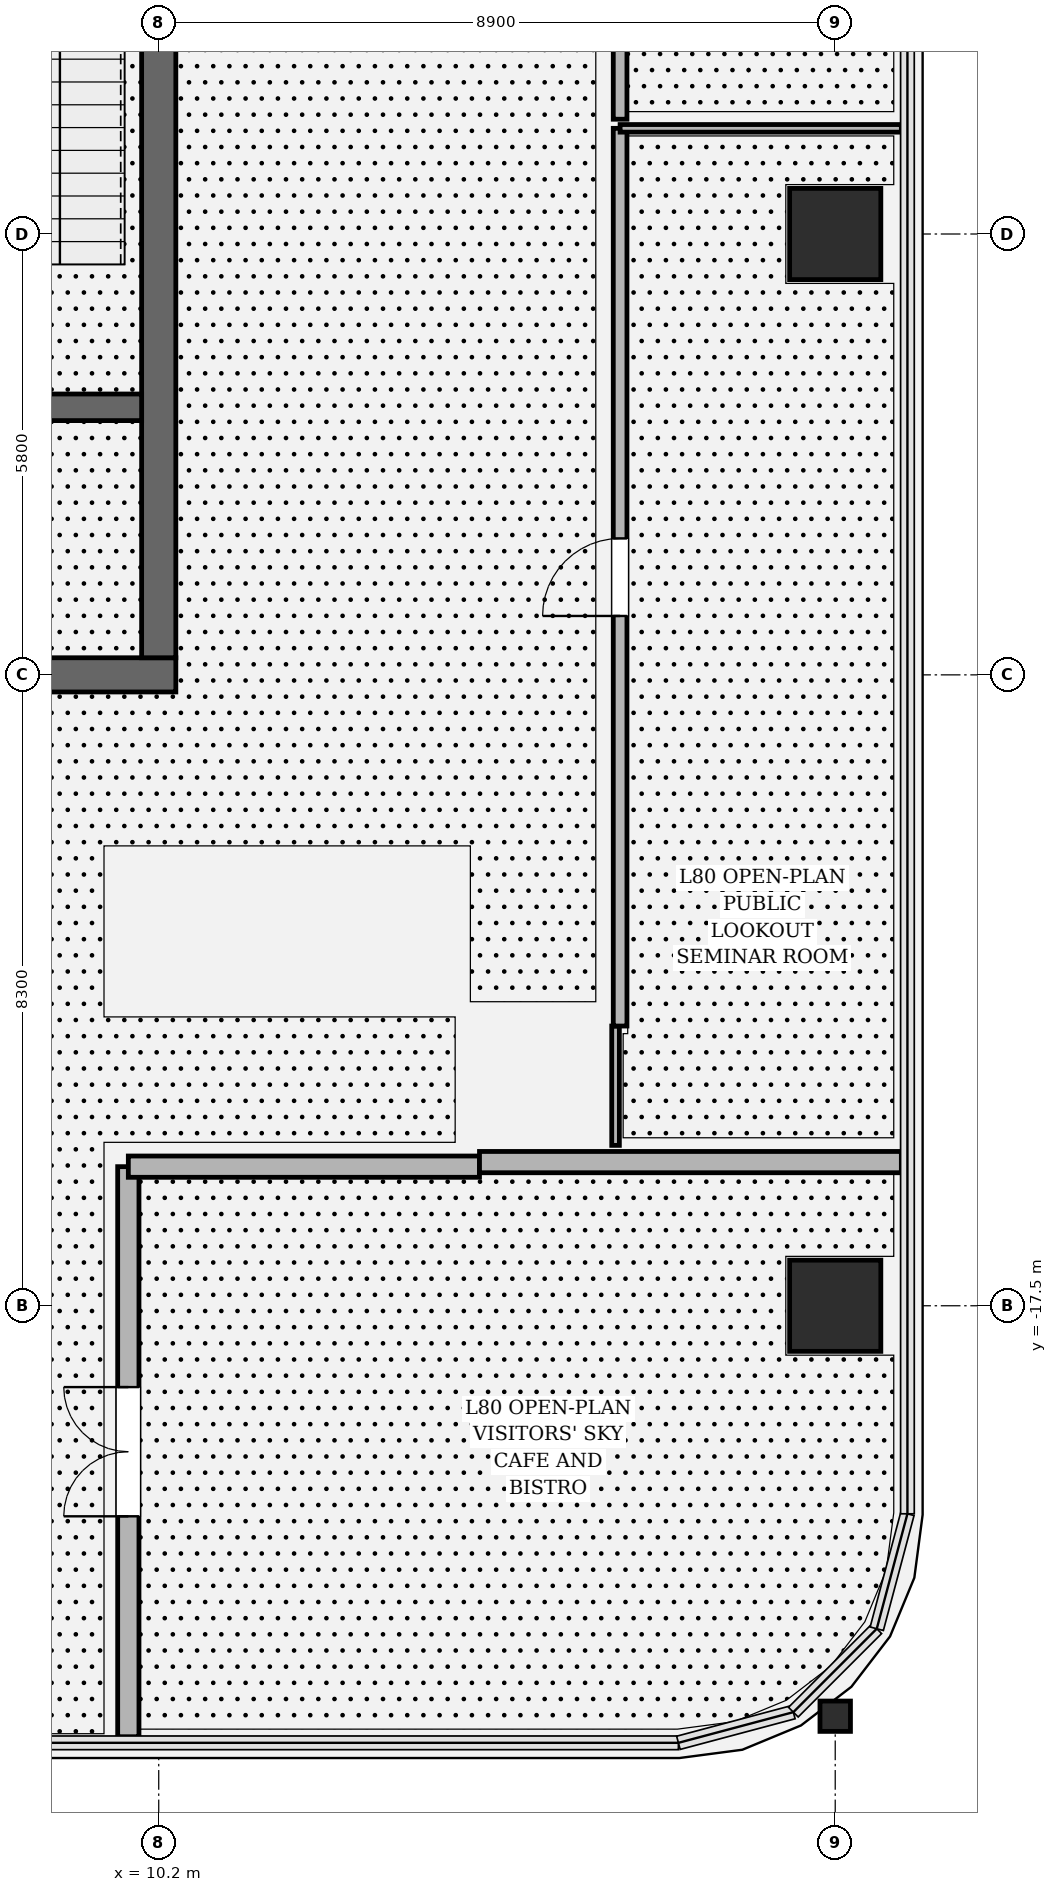
"""IFC4 building model, lengths in metres.
Left out: names, types, materials, properties, quantities, classifications, styles, units other than length and angle.
Written with IfcOpenShell. Run it as: python <this file> out.ifc"""

import sys

from ifc_helpers import new_model, si_unit, direction, frame, frame_2d, origin, origin_2d, place, context, subcontext, project, spatial, rectangle, hollow_rectangle, i_section, extrude, element, fill, save


model = new_model("IFC4")
c1 = context("Model", 3, precision=1e-05, world=origin(), true_north=direction((0.0, 1.0)))
c2 = subcontext(c1, "Body", "Model", "MODEL_VIEW")
j1 = project(units=[si_unit("LENGTHUNIT", "METRE"), si_unit("PLANEANGLEUNIT", "RADIAN")], contexts=[c1])
p1 = place(None, origin())
s1 = spatial("IfcSite", under=j1, at=p1, CompositionType="ELEMENT")
p2 = place(p1, origin())
s2 = spatial("IfcBuilding", under=s1, at=p2, CompositionType="ELEMENT")
p3 = place(p2, frame((0.0, 0.0, 339.0)))
s3 = spatial("IfcBuildingStorey", under=s2, at=p3, CompositionType="ELEMENT", Elevation=339.0)
p4 = place(p3, frame((10.425, -9.2, 0.0), z_axis=(0.0, 0.0, 1.0), x_axis=(-1.0, 0.0, 0.0)))
e1 = element("IfcWall", 1, at=p4, inside=s3, PredefinedType="SHEAR", context=c2, shape_type="SweptSolid", body=[
    extrude(rectangle(XDim=20.85, YDim=0.45, at=frame_2d((10.425, 0.0))), origin(), (0.0, 0.0, 1.0), 4.8),
])
p5 = place(p4, frame((2.7, 0.0, 0.0)))
e2 = element("IfcOpeningElement", 2, at=p5, cuts=e1, PredefinedType="OPENING", context=c2, shape_type="SweptSolid", body=[
    extrude(rectangle(XDim=1.25, YDim=2.25, at=frame_2d((0.625, 1.125))), frame((0.0, 0.235, 0.0), z_axis=(0.0, -1.0, 0.0), x_axis=(1.0, 0.0, 0.0)), (0.0, 0.0, 1.0), 0.47),
])
p6 = place(p4, frame((16.9, 0.0, 0.0)))
e3 = element("IfcOpeningElement", 3, at=p6, cuts=e1, PredefinedType="OPENING", context=c2, shape_type="SweptSolid", body=[
    extrude(rectangle(XDim=1.25, YDim=2.25, at=frame_2d((0.625, 1.125))), frame((0.0, 0.235, 0.0), z_axis=(0.0, -1.0, 0.0), x_axis=(1.0, 0.0, 0.0)), (0.0, 0.0, 1.0), 0.47),
])
p7 = place(p4, frame((10.925, 0.0, 0.0)))
e4 = element("IfcOpeningElement", 4, at=p7, cuts=e1, PredefinedType="OPENING", context=c2, shape_type="SweptSolid", body=[
    extrude(rectangle(XDim=1.2, YDim=2.3, at=frame_2d((0.6, 1.15))), frame((0.0, 0.235, 0.0), z_axis=(0.0, -1.0, 0.0), x_axis=(1.0, 0.0, 0.0)), (0.0, 0.0, 1.0), 0.47),
])
p8 = place(p4, frame((8.725, 0.0, 0.0)))
e5 = element("IfcOpeningElement", 5, at=p8, cuts=e1, PredefinedType="OPENING", context=c2, shape_type="SweptSolid", body=[
    extrude(rectangle(XDim=1.2, YDim=2.3, at=frame_2d((0.6, 1.15))), frame((0.0, 0.235, 0.0), z_axis=(0.0, -1.0, 0.0), x_axis=(1.0, 0.0, 0.0)), (0.0, 0.0, 1.0), 0.47),
])
p9 = place(p3, frame((10.2, 8.975, 0.0), z_axis=(0.0, 0.0, 1.0), x_axis=(0.0, -1.0, 0.0)))
e6 = element("IfcWall", 6, at=p9, inside=s3, PredefinedType="SHEAR", context=c2, shape_type="SweptSolid", body=[
    extrude(rectangle(XDim=17.95, YDim=0.45, at=frame_2d((8.975, 0.0))), origin(), (0.0, 0.0, 1.0), 4.8),
])
p10 = place(p9, frame((4.005, 0.0, 0.0)))
e7 = element("IfcOpeningElement", 7, at=p10, cuts=e6, PredefinedType="OPENING", context=c2, shape_type="SweptSolid", body=[
    extrude(rectangle(XDim=1.18, YDim=2.2, at=frame_2d((0.59, 1.1))), frame((0.0, 0.235, 0.0), z_axis=(0.0, -1.0, 0.0), x_axis=(1.0, 0.0, 0.0)), (0.0, 0.0, 1.0), 0.47),
])
p11 = place(p3, frame((4.65, -5.68, 0.0), z_axis=(0.0, 0.0, 1.0), x_axis=(1.0, 0.0, 0.0)))
e8 = element("IfcWall", 8, at=p11, inside=s3, PredefinedType="SOLIDWALL", context=c2, shape_type="SweptSolid", body=[
    extrude(rectangle(XDim=5.325, YDim=0.35, at=frame_2d((2.663, 0.0))), origin(), (0.0, 0.0, 1.0), 4.8),
])
p12 = place(p11, frame((2.71, 0.0, 0.0)))
e9 = element("IfcOpeningElement", 9, at=p12, cuts=e8, PredefinedType="OPENING", context=c2, shape_type="SweptSolid", body=[
    extrude(rectangle(XDim=1.18, YDim=2.2, at=frame_2d((0.59, 1.1))), frame((0.0, 0.185, 0.0), z_axis=(0.0, -1.0, 0.0), x_axis=(1.0, 0.0, 0.0)), (0.0, 0.0, 1.0), 0.37),
])
for number, where, z_axis, x_axis in (
    (10, (19.1, -17.5, 0.0), (0.0, 0.0, 1.0), (1.0, 0.0, 0.0)),
    (11, (19.1, -3.4, 0.0), (0.0, 0.0, 1.0), (1.0, 0.0, 0.0)),
):
    element("IfcColumn", number, at=place(p3, frame(where, z_axis=z_axis, x_axis=x_axis)), inside=s3, PredefinedType="COLUMN", context=c2, shape_type="SweptSolid", body=[
        extrude(hollow_rectangle(XDim=1.2, YDim=1.2, WallThickness=0.035, at=origin_2d()), origin(), (0.0, 0.0, 1.0), 4.8),
    ])
p13 = place(p3, frame((19.1, -22.9, 0.0), z_axis=(0.0, 0.0, 1.0), x_axis=(1.0, 0.0, 0.0)))
e12 = element("IfcColumn", 12, at=p13, inside=s3, PredefinedType="COLUMN", context=c2, shape_type="SweptSolid", body=[
    extrude(i_section(OverallWidth=0.401, OverallDepth=0.399, WebThickness=0.025, FlangeThickness=0.04, FilletRadius=0.018, at=origin_2d()), origin(), (0.0, 0.0, 1.0), 4.798),
])
p14 = place(p3, frame((9.8, -23.17, 0.0), z_axis=(0.0, 0.0, 1.0), x_axis=(0.0, 1.0, 0.0)))
e13 = element("IfcWall", 13, at=p14, inside=s3, PredefinedType="SOLIDWALL", context=c2, shape_type="SweptSolid", body=[
    extrude(rectangle(XDim=7.5, YDim=0.28, at=frame_2d((3.75, 0.0))), origin(), (0.0, 0.0, 1.0), 3.194),
])
p15 = place(p14, frame((2.9, 0.0, 0.0)))
e14 = element("IfcOpeningElement", 14, at=p15, cuts=e13, PredefinedType="OPENING", context=c2, shape_type="SweptSolid", body=[
    extrude(rectangle(XDim=1.7, YDim=2.3, at=frame_2d((0.85, 1.15))), frame((0.0, 0.15, 0.0), z_axis=(0.0, -1.0, 0.0), x_axis=(1.0, 0.0, 0.0)), (0.0, 0.0, 1.0), 0.3),
])
p16 = place(p3, frame((9.8, -15.67, 0.0), z_axis=(0.0, 0.0, 1.0), x_axis=(1.0, 0.0, 0.0)))
e15 = element("IfcWall", 15, at=p16, inside=s3, PredefinedType="SOLIDWALL", context=c2, shape_type="SweptSolid", body=[
    extrude(rectangle(XDim=4.62, YDim=0.28, at=frame_2d((2.31, 0.0))), origin(), (0.0, 0.0, 1.0), 3.194),
])
p17 = place(p3, frame((14.42, -15.61, 0.0), z_axis=(0.0, 0.0, 1.0), x_axis=(1.0, 0.0, 0.0)))
e16 = element("IfcWall", 16, at=p17, inside=s3, PredefinedType="SOLIDWALL", context=c2, shape_type="SweptSolid", body=[
    extrude(rectangle(XDim=5.55, YDim=0.28, at=frame_2d((2.775, 0.0))), origin(), (0.0, 0.0, 1.0), 3.194),
])
p18 = place(p3, frame((16.21, -15.39, 0.0), z_axis=(0.0, 0.0, 1.0), x_axis=(0.0, 1.0, 0.0)))
e17 = element("IfcWall", 17, at=p18, inside=s3, PredefinedType="PARTITIONING", context=c2, shape_type="SweptSolid", body=[
    extrude(rectangle(XDim=1.57, YDim=0.1, at=frame_2d((0.785, 0.0))), origin(), (0.0, 0.0, 1.0), 4.52),
])
p19 = place(p3, frame((16.27, -13.82, 0.0), z_axis=(0.0, 0.0, 1.0), x_axis=(0.0, 1.0, 0.0)))
e18 = element("IfcWall", 18, at=p19, inside=s3, PredefinedType="PARTITIONING", context=c2, shape_type="SweptSolid", body=[
    extrude(rectangle(XDim=11.81, YDim=0.18, at=frame_2d((5.905, 0.0))), origin(), (0.0, 0.0, 1.0), 3.194),
])
p20 = place(p19, frame((5.395, 0.0, 0.0)))
e19 = element("IfcOpeningElement", 19, at=p20, cuts=e18, PredefinedType="OPENING", context=c2, shape_type="SweptSolid", body=[
    extrude(rectangle(XDim=1.02, YDim=2.2, at=frame_2d((0.51, 1.1))), frame((0.0, 0.1, 0.0), z_axis=(0.0, -1.0, 0.0), x_axis=(1.0, 0.0, 0.0)), (0.0, 0.0, 1.0), 0.2),
])
p21 = place(p3, frame((16.27, -2.01, 0.0), z_axis=(0.0, 0.0, 1.0), x_axis=(1.0, 0.0, 0.0)))
e20 = element("IfcWall", 20, at=p21, inside=s3, PredefinedType="PARTITIONING", context=c2, shape_type="SweptSolid", body=[
    extrude(rectangle(XDim=3.7, YDim=0.1, at=frame_2d((1.85, 0.0))), origin(), (0.0, 0.0, 1.0), 3.194),
])
p22 = place(p3, frame((16.27, -1.89, 0.0), z_axis=(0.0, 0.0, 1.0), x_axis=(0.0, 1.0, 0.0)))
e21 = element("IfcWall", 21, at=p22, inside=s3, PredefinedType="PARTITIONING", context=c2, shape_type="SweptSolid", body=[
    extrude(rectangle(XDim=13.38, YDim=0.18, at=frame_2d((6.69, 0.0))), origin(), (0.0, 0.0, 1.0), 3.194),
])
p23 = place(p22, frame((6.165, 0.0, 0.0)))
e22 = element("IfcOpeningElement", 22, at=p23, cuts=e21, PredefinedType="OPENING", context=c2, shape_type="SweptSolid", body=[
    extrude(rectangle(XDim=1.05, YDim=2.2, at=frame_2d((0.525, 1.1))), frame((0.0, 0.1, 0.0), z_axis=(0.0, -1.0, 0.0), x_axis=(1.0, 0.0, 0.0)), (0.0, 0.0, 1.0), 0.2),
])
p24 = place(p15, origin())
e23 = element("IfcDoor", 23, at=p24, inside=s3, OperationType="DOUBLE_DOOR_SINGLE_SWING", PredefinedType="DOOR", context=c2, shape_type="SweptSolid", body=[
    extrude(rectangle(XDim=1.7, YDim=2.3, at=frame_2d((0.85, 1.15))), frame((0.0, 0.025, 0.0), z_axis=(0.0, -1.0, 0.0), x_axis=(1.0, 0.0, 0.0)), (0.0, 0.0, 1.0), 0.05),
])
fill(e14, e23)
p25 = place(p20, origin())
e24 = element("IfcDoor", 24, at=p25, inside=s3, OperationType="SINGLE_SWING_LEFT", PredefinedType="DOOR", context=c2, shape_type="SweptSolid", body=[
    extrude(rectangle(XDim=1.02, YDim=2.2, at=frame_2d((0.51, 1.1))), frame((0.0, 0.025, 0.0), z_axis=(0.0, -1.0, 0.0), x_axis=(1.0, 0.0, 0.0)), (0.0, 0.0, 1.0), 0.05),
])
fill(e19, e24)
save(model, sys.argv[1])
